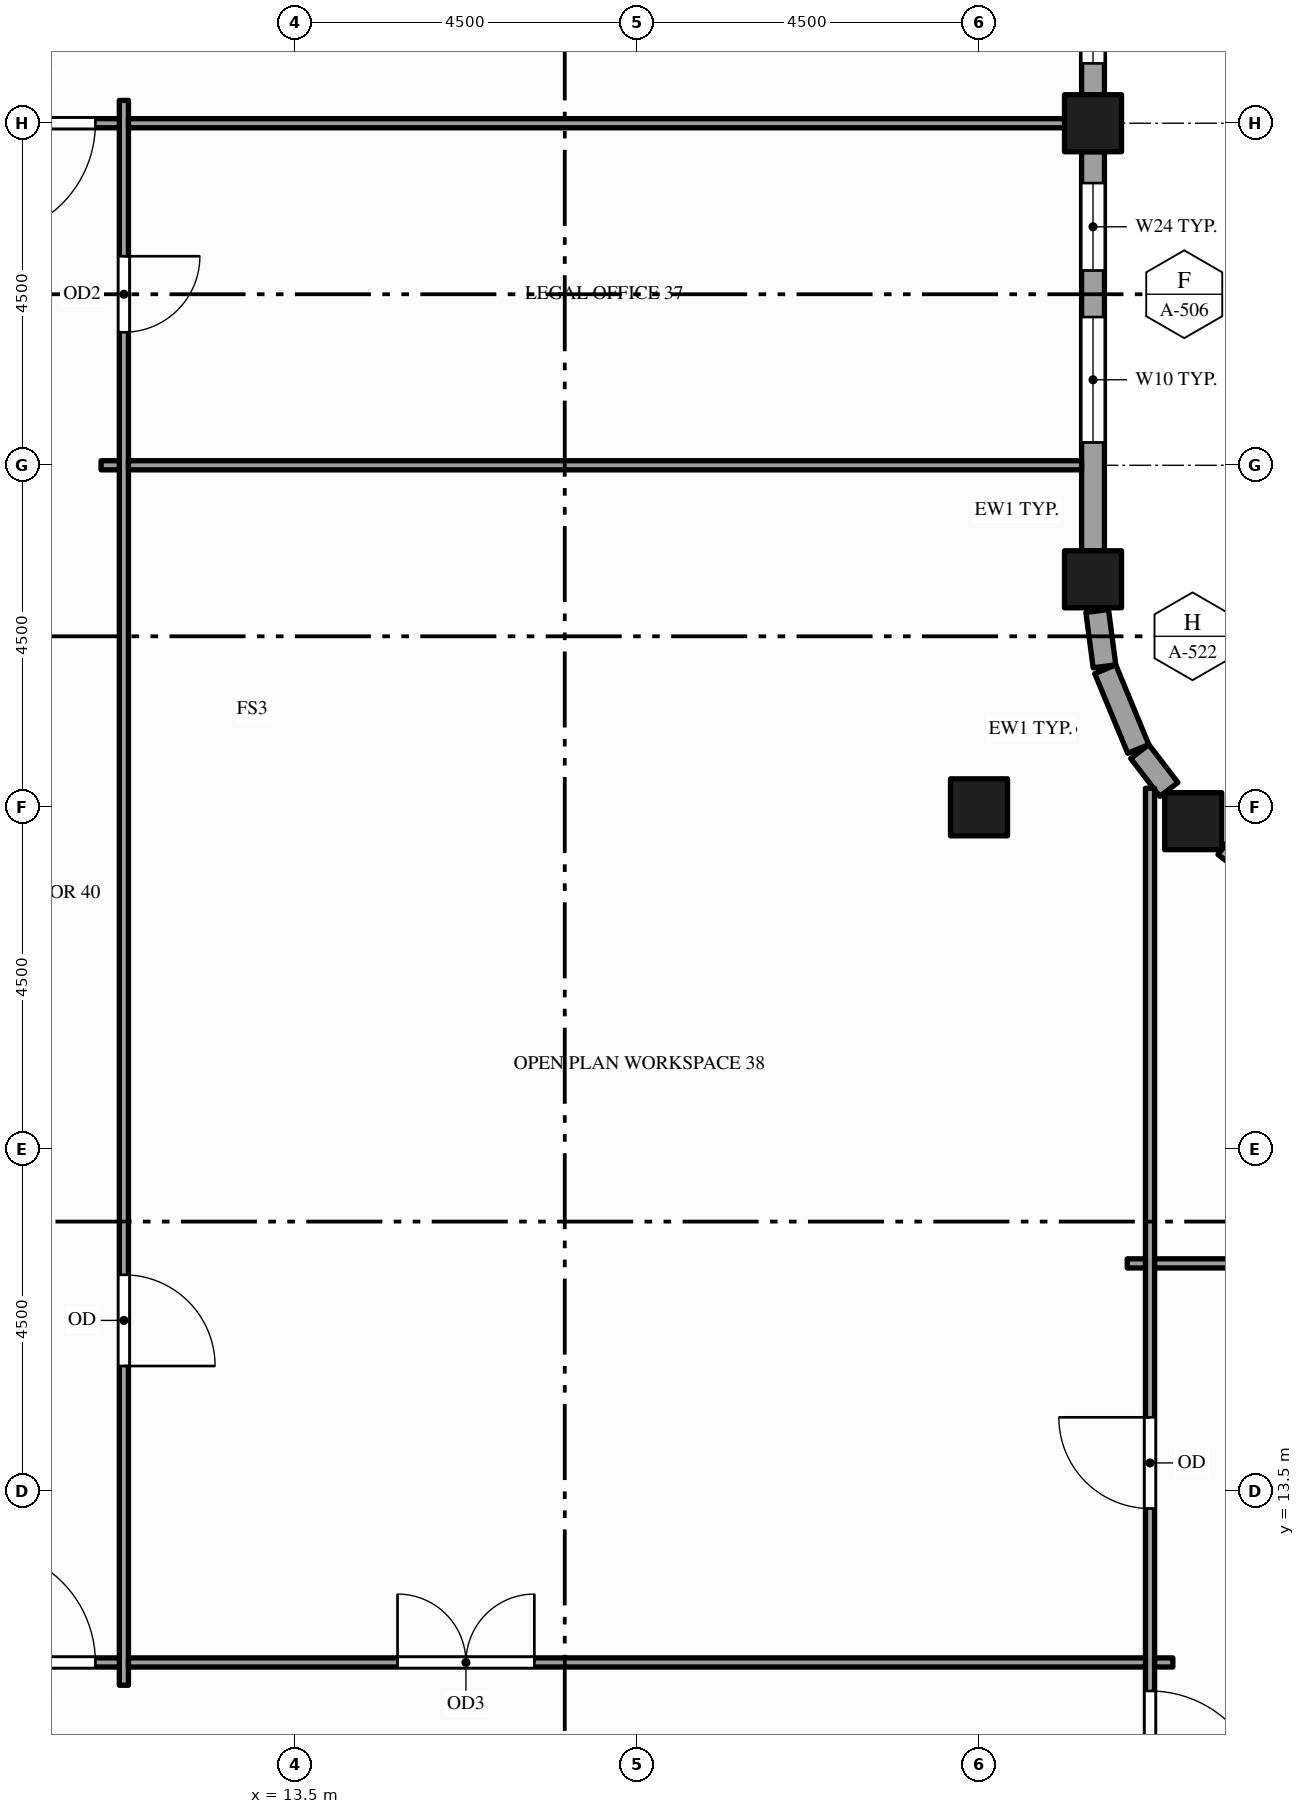
"""IFC4 building model, lengths in metres.
Left out: names, types, materials, properties, quantities, classifications, styles, units other than length and angle.
Written with IfcOpenShell. Run it as: python <this file> out.ifc"""

import sys

from ifc_helpers import new_model, si_unit, direction, frame, frame_2d, origin, origin_2d, place, context, subcontext, project, spatial, rectangle, hollow_rectangle, extrude, element, fill, save


model = new_model("IFC4")
c1 = context("Model", 3, precision=1e-05, world=origin(), true_north=direction((0.0, 1.0)))
c2 = subcontext(c1, "Body", "Model", "MODEL_VIEW")
j1 = project(units=[si_unit("LENGTHUNIT", "METRE"), si_unit("PLANEANGLEUNIT", "RADIAN")], contexts=[c1])
p1 = place(None, origin())
s1 = spatial("IfcSite", under=j1, at=p1, CompositionType="ELEMENT")
p2 = place(p1, origin())
s2 = spatial("IfcBuilding", under=s1, at=p2, CompositionType="ELEMENT")
p3 = place(p2, frame((0.0, 0.0, 195.0)))
s3 = spatial("IfcBuildingStorey", under=s2, at=p3, CompositionType="ELEMENT", Elevation=195.0)
for number, where, z_axis, x_axis in (
    (1, (22.5, 22.5, -0.15), (0.0, 0.0, 1.0), (1.0, 0.0, 0.0)),
    (2, (24.0, 25.5, -0.15), (0.0, 0.0, 1.0), (1.0, 0.0, 0.0)),
    (3, (24.0, 31.5, -0.15), (0.0, 0.0, 1.0), (1.0, 0.0, 0.0)),
    (4, (25.318, 22.318, -0.15), (0.0, 0.0, 1.0), (1.0, 0.0, 0.0)),
):
    element("IfcColumn", number, at=place(p3, frame(where, z_axis=z_axis, x_axis=x_axis)), inside=s3, PredefinedType="COLUMN", context=c2, shape_type="SweptSolid", body=[
        extrude(hollow_rectangle(XDim=0.75, YDim=0.75, WallThickness=0.036, at=origin_2d()), origin(), (0.0, 0.0, 1.0), 4.0),
    ])
p4 = place(p3, frame((26.234, 21.615, 0.0), z_axis=(0.0, 0.0, 1.0), x_axis=(-0.793575131083, 0.608472276547, 0.0)))
e5 = element("IfcWall", 5, at=p4, inside=s3, PredefinedType="STANDARD", context=c2, shape_type="SweptSolid", body=[
    extrude(rectangle(XDim=0.629, YDim=0.3, at=frame_2d((0.314, 0.0))), origin(), (0.0, 0.0, 1.0), 3.157),
])
p5 = place(p3, frame((24.998, 22.735, 0.0), z_axis=(0.0, 0.0, 1.0), x_axis=(-0.608472276547, 0.793575131083, 0.0)))
e6 = element("IfcWall", 6, at=p5, inside=s3, PredefinedType="STANDARD", context=c2, shape_type="SweptSolid", body=[
    extrude(rectangle(XDim=0.629, YDim=0.3, at=frame_2d((0.314, 0.0))), origin(), (0.0, 0.0, 1.0), 2.76),
])
p6 = place(p3, frame((24.595, 23.268, 0.0), z_axis=(0.0, 0.0, 1.0), x_axis=(-0.382598720491, 0.923914616768, 0.0)))
e7 = element("IfcWall", 7, at=p6, inside=s3, PredefinedType="STANDARD", context=c2, shape_type="SweptSolid", body=[
    extrude(rectangle(XDim=1.135, YDim=0.3, at=frame_2d((0.568, 0.0))), origin(), (0.0, 0.0, 1.0), 2.76),
])
p7 = place(p3, frame((24.151, 24.355, 0.0), z_axis=(0.0, 0.0, 1.0), x_axis=(-0.130660917588, 0.99142711513, 0.0)))
e8 = element("IfcWall", 8, at=p7, inside=s3, PredefinedType="STANDARD", context=c2, shape_type="SweptSolid", body=[
    extrude(rectangle(XDim=0.734, YDim=0.3, at=frame_2d((0.367, 0.0))), origin(), (0.0, 0.0, 1.0), 3.157),
])
p8 = place(p3, frame((24.0, 25.875, 0.0), z_axis=(0.0, 0.0, 1.0), x_axis=(0.0, 1.0, 0.0)))
e9 = element("IfcWall", 9, at=p8, inside=s3, PredefinedType="STANDARD", context=c2, shape_type="SweptSolid", body=[
    extrude(rectangle(XDim=5.25, YDim=0.3, at=frame_2d((2.625, 0.0))), origin(), (0.0, 0.0, 1.0), 3.157),
])
p9 = place(p8, frame((1.425, 0.0, 0.9)))
e10 = element("IfcOpeningElement", 10, at=p9, cuts=e9, PredefinedType="OPENING", context=c2, shape_type="SweptSolid", body=[
    extrude(rectangle(XDim=1.65, YDim=2.0, at=frame_2d((0.825, 1.0))), frame((0.0, 0.16, 0.0), z_axis=(0.0, -1.0, 0.0), x_axis=(1.0, 0.0, 0.0)), (0.0, 0.0, 1.0), 0.32),
])
p10 = place(p8, frame((3.688, 0.0, 0.9)))
e11 = element("IfcOpeningElement", 11, at=p10, cuts=e9, PredefinedType="OPENING", context=c2, shape_type="SweptSolid", body=[
    extrude(rectangle(XDim=1.15, YDim=2.0, at=frame_2d((0.575, 1.0))), frame((0.0, 0.16, 0.0), z_axis=(0.0, -1.0, 0.0), x_axis=(1.0, 0.0, 0.0)), (0.0, 0.0, 1.0), 0.32),
])
p11 = place(p3, frame((24.0, 31.875, 0.0), z_axis=(0.0, 0.0, 1.0), x_axis=(0.0, 1.0, 0.0)))
e12 = element("IfcWall", 12, at=p11, inside=s3, PredefinedType="STANDARD", context=c2, shape_type="SweptSolid", body=[
    extrude(rectangle(XDim=3.75, YDim=0.3, at=frame_2d((1.875, 0.0))), origin(), (0.0, 0.0, 1.0), 3.157),
])
p12 = place(p11, frame((0.413, 0.0, 0.9)))
e13 = element("IfcOpeningElement", 13, at=p12, cuts=e12, PredefinedType="OPENING", context=c2, shape_type="SweptSolid", body=[
    extrude(rectangle(XDim=1.15, YDim=2.0, at=frame_2d((0.575, 1.0))), frame((0.0, 0.16, 0.0), z_axis=(0.0, -1.0, 0.0), x_axis=(1.0, 0.0, 0.0)), (0.0, 0.0, 1.0), 0.32),
])
p13 = place(p11, frame((2.188, 0.0, 0.9)))
e14 = element("IfcOpeningElement", 14, at=p13, cuts=e12, PredefinedType="OPENING", context=c2, shape_type="SweptSolid", body=[
    extrude(rectangle(XDim=1.15, YDim=2.0, at=frame_2d((0.575, 1.0))), frame((0.0, 0.16, 0.0), z_axis=(0.0, -1.0, 0.0), x_axis=(1.0, 0.0, 0.0)), (0.0, 0.0, 1.0), 0.32),
])
p14 = place(p3, frame((11.25, 10.95, 0.0), z_axis=(0.0, 0.0, 1.0), x_axis=(0.0, 1.0, 0.0)))
e15 = element("IfcWall", 15, at=p14, inside=s3, PredefinedType="PARTITIONING", context=c2, shape_type="SweptSolid", body=[
    extrude(rectangle(XDim=20.85, YDim=0.12, at=frame_2d((10.425, 0.0))), origin(), (0.0, 0.0, 1.0), 2.6),
])
p15 = place(p14, frame((17.8, 0.0, 0.0)))
e16 = element("IfcOpeningElement", 16, at=p15, cuts=e15, PredefinedType="OPENING", context=c2, shape_type="SweptSolid", body=[
    extrude(rectangle(XDim=1.0, YDim=2.1, at=frame_2d((0.5, 1.05))), frame((0.0, 0.07, 0.0), z_axis=(0.0, -1.0, 0.0), x_axis=(1.0, 0.0, 0.0)), (0.0, 0.0, 1.0), 0.14),
])
p16 = place(p14, frame((4.2, 0.0, 0.0)))
e17 = element("IfcOpeningElement", 17, at=p16, cuts=e15, PredefinedType="OPENING", context=c2, shape_type="SweptSolid", body=[
    extrude(rectangle(XDim=1.2, YDim=2.1, at=frame_2d((0.6, 1.05))), frame((0.0, 0.07, 0.0), z_axis=(0.0, -1.0, 0.0), x_axis=(1.0, 0.0, 0.0)), (0.0, 0.0, 1.0), 0.14),
])
p17 = place(p3, frame((24.75, -1.35, 0.0), z_axis=(0.0, 0.0, 1.0), x_axis=(0.0, 1.0, 0.0)))
e18 = element("IfcWall", 18, at=p17, inside=s3, PredefinedType="PARTITIONING", context=c2, shape_type="SweptSolid", body=[
    extrude(rectangle(XDim=24.101, YDim=0.12, at=frame_2d((12.05, 0.0))), origin(), (0.0, 0.0, 1.0), 2.76),
])
p18 = place(p17, frame((10.725, 0.0, 0.0)))
e19 = element("IfcOpeningElement", 19, at=p18, cuts=e18, PredefinedType="OPENING", context=c2, shape_type="SweptSolid", body=[
    extrude(rectangle(XDim=1.5, YDim=2.1, at=frame_2d((0.75, 1.05))), frame((0.0, 0.07, 0.0), z_axis=(0.0, -1.0, 0.0), x_axis=(1.0, 0.0, 0.0)), (0.0, 0.0, 1.0), 0.14),
])
p19 = place(p17, frame((14.625, 0.0, 0.0)))
e20 = element("IfcOpeningElement", 20, at=p19, cuts=e18, PredefinedType="OPENING", context=c2, shape_type="SweptSolid", body=[
    extrude(rectangle(XDim=1.2, YDim=2.1, at=frame_2d((0.6, 1.05))), frame((0.0, 0.07, 0.0), z_axis=(0.0, -1.0, 0.0), x_axis=(1.0, 0.0, 0.0)), (0.0, 0.0, 1.0), 0.14),
])
p20 = place(p3, frame((9.06, 11.25, 0.0), z_axis=(0.0, 0.0, 1.0), x_axis=(1.0, 0.0, 0.0)))
e21 = element("IfcWall", 21, at=p20, inside=s3, PredefinedType="PARTITIONING", context=c2, shape_type="SweptSolid", body=[
    extrude(rectangle(XDim=2.13, YDim=0.12, at=frame_2d((1.065, 0.0))), origin(), (0.0, 0.0, 1.0), 2.87),
])
p21 = place(p20, frame((0.315, 0.0, 0.0)))
e22 = element("IfcOpeningElement", 22, at=p21, cuts=e21, PredefinedType="OPENING", context=c2, shape_type="SweptSolid", body=[
    extrude(rectangle(XDim=1.5, YDim=2.1, at=frame_2d((0.75, 1.05))), frame((0.0, 0.07, 0.0), z_axis=(0.0, -1.0, 0.0), x_axis=(1.0, 0.0, 0.0)), (0.0, 0.0, 1.0), 0.14),
])
p22 = place(p3, frame((11.31, 11.25, 0.0), z_axis=(0.0, 0.0, 1.0), x_axis=(1.0, 0.0, 0.0)))
e23 = element("IfcWall", 23, at=p22, inside=s3, PredefinedType="PARTITIONING", context=c2, shape_type="SweptSolid", body=[
    extrude(rectangle(XDim=13.38, YDim=0.12, at=frame_2d((6.69, 0.0))), origin(), (0.0, 0.0, 1.0), 2.76),
])
p23 = place(p22, frame((3.54, 0.0, 0.0)))
e24 = element("IfcOpeningElement", 24, at=p23, cuts=e23, PredefinedType="OPENING", context=c2, shape_type="SweptSolid", body=[
    extrude(rectangle(XDim=1.8, YDim=2.1, at=frame_2d((0.9, 1.05))), frame((0.0, 0.07, 0.0), z_axis=(0.0, -1.0, 0.0), x_axis=(1.0, 0.0, 0.0)), (0.0, 0.0, 1.0), 0.14),
])
for number, where, z_axis, x_axis in (
    (25, (24.81, 11.25, 0.0), (0.0, 0.0, 1.0), (1.0, 0.0, 0.0)),
    (26, (24.45, 16.5, 0.0), (0.0, 0.0, 1.0), (1.0, 0.0, 0.0)),
):
    element("IfcWall", number, at=place(p3, frame(where, z_axis=z_axis, x_axis=x_axis)), inside=s3, PredefinedType="PARTITIONING", context=c2, shape_type="SweptSolid", body=[
        extrude(rectangle(XDim=0.24, YDim=0.12, at=frame_2d((0.12, 0.0))), origin(), (0.0, 0.0, 1.0), 2.76),
    ])
p24 = place(p3, frame((24.81, 16.5, 0.0), z_axis=(0.0, 0.0, 1.0), x_axis=(1.0, 0.0, 0.0)))
e27 = element("IfcWall", 27, at=p24, inside=s3, PredefinedType="PARTITIONING", context=c2, shape_type="SweptSolid", body=[
    extrude(rectangle(XDim=2.13, YDim=0.12, at=frame_2d((1.065, 0.0))), origin(), (0.0, 0.0, 1.0), 2.76),
])
p25 = place(p3, frame((10.95, 27.0, 0.0), z_axis=(0.0, 0.0, 1.0), x_axis=(1.0, 0.0, 0.0)))
e28 = element("IfcWall", 28, at=p25, inside=s3, PredefinedType="PARTITIONING", context=c2, shape_type="SweptSolid", body=[
    extrude(rectangle(XDim=0.24, YDim=0.12, at=frame_2d((0.12, 0.0))), origin(), (0.0, 0.0, 1.0), 2.87),
])
p26 = place(p3, frame((11.31, 27.0, 0.0), z_axis=(0.0, 0.0, 1.0), x_axis=(1.0, 0.0, 0.0)))
e29 = element("IfcWall", 29, at=p26, inside=s3, PredefinedType="PARTITIONING", context=c2, shape_type="SweptSolid", body=[
    extrude(rectangle(XDim=12.54, YDim=0.12, at=frame_2d((6.27, 0.0))), origin(), (0.0, 0.0, 1.0), 2.87),
])
p27 = place(p3, frame((9.06, 31.5, 0.0), z_axis=(0.0, 0.0, 1.0), x_axis=(1.0, 0.0, 0.0)))
e30 = element("IfcWall", 30, at=p27, inside=s3, PredefinedType="PARTITIONING", context=c2, shape_type="SweptSolid", body=[
    extrude(rectangle(XDim=2.13, YDim=0.12, at=frame_2d((1.065, 0.0))), origin(), (0.0, 0.0, 1.0), 2.87),
])
p28 = place(p27, frame((0.315, 0.0, 0.0)))
e31 = element("IfcOpeningElement", 31, at=p28, cuts=e30, PredefinedType="OPENING", context=c2, shape_type="SweptSolid", body=[
    extrude(rectangle(XDim=1.5, YDim=2.1, at=frame_2d((0.75, 1.05))), frame((0.0, 0.07, 0.0), z_axis=(0.0, -1.0, 0.0), x_axis=(1.0, 0.0, 0.0)), (0.0, 0.0, 1.0), 0.14),
])
p29 = place(p3, frame((11.31, 31.5, 0.0), z_axis=(0.0, 0.0, 1.0), x_axis=(1.0, 0.0, 0.0)))
e32 = element("IfcWall", 32, at=p29, inside=s3, PredefinedType="PARTITIONING", context=c2, shape_type="SweptSolid", body=[
    extrude(rectangle(XDim=12.54, YDim=0.12, at=frame_2d((6.27, 0.0))), origin(), (0.0, 0.0, 1.0), 2.87),
])
p30 = place(p9, origin())
e33 = element("IfcWindow", 33, at=p30, inside=s3, PartitioningType="SINGLE_PANEL", PredefinedType="WINDOW", context=c2, shape_type="SweptSolid", body=[
    extrude(rectangle(XDim=1.65, YDim=2.0, at=frame_2d((0.825, 1.0))), frame((0.0, 0.03, 0.0), z_axis=(0.0, -1.0, 0.0), x_axis=(1.0, 0.0, 0.0)), (0.0, 0.0, 1.0), 0.06),
])
fill(e10, e33)
p31 = place(p10, origin())
e34 = element("IfcWindow", 34, at=p31, inside=s3, PartitioningType="SINGLE_PANEL", PredefinedType="WINDOW", context=c2, shape_type="SweptSolid", body=[
    extrude(rectangle(XDim=1.15, YDim=2.0, at=frame_2d((0.575, 1.0))), frame((0.0, 0.03, 0.0), z_axis=(0.0, -1.0, 0.0), x_axis=(1.0, 0.0, 0.0)), (0.0, 0.0, 1.0), 0.06),
])
fill(e11, e34)
p32 = place(p12, origin())
e35 = element("IfcWindow", 35, at=p32, inside=s3, PartitioningType="SINGLE_PANEL", PredefinedType="WINDOW", context=c2, shape_type="SweptSolid", body=[
    extrude(rectangle(XDim=1.15, YDim=2.0, at=frame_2d((0.575, 1.0))), frame((0.0, 0.03, 0.0), z_axis=(0.0, -1.0, 0.0), x_axis=(1.0, 0.0, 0.0)), (0.0, 0.0, 1.0), 0.06),
])
fill(e13, e35)
p33 = place(p18, origin())
e36 = element("IfcDoor", 36, at=p33, inside=s3, OperationType="SINGLE_SWING_LEFT", PredefinedType="DOOR", context=c2, shape_type="SweptSolid", body=[
    extrude(rectangle(XDim=1.5, YDim=2.1, at=frame_2d((0.75, 1.05))), frame((0.0, 0.025, 0.0), z_axis=(0.0, -1.0, 0.0), x_axis=(1.0, 0.0, 0.0)), (0.0, 0.0, 1.0), 0.05),
])
fill(e19, e36)
p34 = place(p23, origin())
e37 = element("IfcDoor", 37, at=p34, inside=s3, OperationType="DOUBLE_DOOR_SINGLE_SWING", PredefinedType="DOOR", context=c2, shape_type="SweptSolid", body=[
    extrude(rectangle(XDim=1.8, YDim=2.1, at=frame_2d((0.9, 1.05))), frame((0.0, 0.025, 0.0), z_axis=(0.0, -1.0, 0.0), x_axis=(1.0, 0.0, 0.0)), (0.0, 0.0, 1.0), 0.05),
])
fill(e24, e37)
p35 = place(p21, origin())
e38 = element("IfcDoor", 38, at=p35, inside=s3, OperationType="SINGLE_SWING_LEFT", PredefinedType="DOOR", context=c2, shape_type="SweptSolid", body=[
    extrude(rectangle(XDim=1.5, YDim=2.1, at=frame_2d((0.75, 1.05))), frame((0.0, 0.025, 0.0), z_axis=(0.0, -1.0, 0.0), x_axis=(1.0, 0.0, 0.0)), (0.0, 0.0, 1.0), 0.05),
])
fill(e22, e38)
p36 = place(p28, origin())
e39 = element("IfcDoor", 39, at=p36, inside=s3, OperationType="SINGLE_SWING_LEFT", PredefinedType="DOOR", context=c2, shape_type="SweptSolid", body=[
    extrude(rectangle(XDim=1.5, YDim=2.1, at=frame_2d((0.75, 1.05))), frame((0.0, 0.025, 0.0), z_axis=(0.0, -1.0, 0.0), x_axis=(1.0, 0.0, 0.0)), (0.0, 0.0, 1.0), 0.05),
])
fill(e31, e39)
p37 = place(p15, origin())
e40 = element("IfcDoor", 40, at=p37, inside=s3, OperationType="SINGLE_SWING_RIGHT", PredefinedType="DOOR", context=c2, shape_type="SweptSolid", body=[
    extrude(rectangle(XDim=1.0, YDim=2.1, at=frame_2d((0.5, 1.05))), frame((0.0, 0.025, 0.0), z_axis=(0.0, -1.0, 0.0), x_axis=(1.0, 0.0, 0.0)), (0.0, 0.0, 1.0), 0.05),
])
fill(e16, e40)
p38 = place(p16, origin())
e41 = element("IfcDoor", 41, at=p38, inside=s3, OperationType="SINGLE_SWING_LEFT", PredefinedType="DOOR", context=c2, shape_type="SweptSolid", body=[
    extrude(rectangle(XDim=1.2, YDim=2.1, at=frame_2d((0.6, 1.05))), frame((0.0, 0.025, 0.0), z_axis=(0.0, -1.0, 0.0), x_axis=(1.0, 0.0, 0.0)), (0.0, 0.0, 1.0), 0.05),
])
fill(e17, e41)
p39 = place(p19, origin())
e42 = element("IfcDoor", 42, at=p39, inside=s3, OperationType="SINGLE_SWING_RIGHT", PredefinedType="DOOR", context=c2, shape_type="SweptSolid", body=[
    extrude(rectangle(XDim=1.2, YDim=2.1, at=frame_2d((0.6, 1.05))), frame((0.0, 0.025, 0.0), z_axis=(0.0, -1.0, 0.0), x_axis=(1.0, 0.0, 0.0)), (0.0, 0.0, 1.0), 0.05),
])
fill(e20, e42)
save(model, sys.argv[1])
